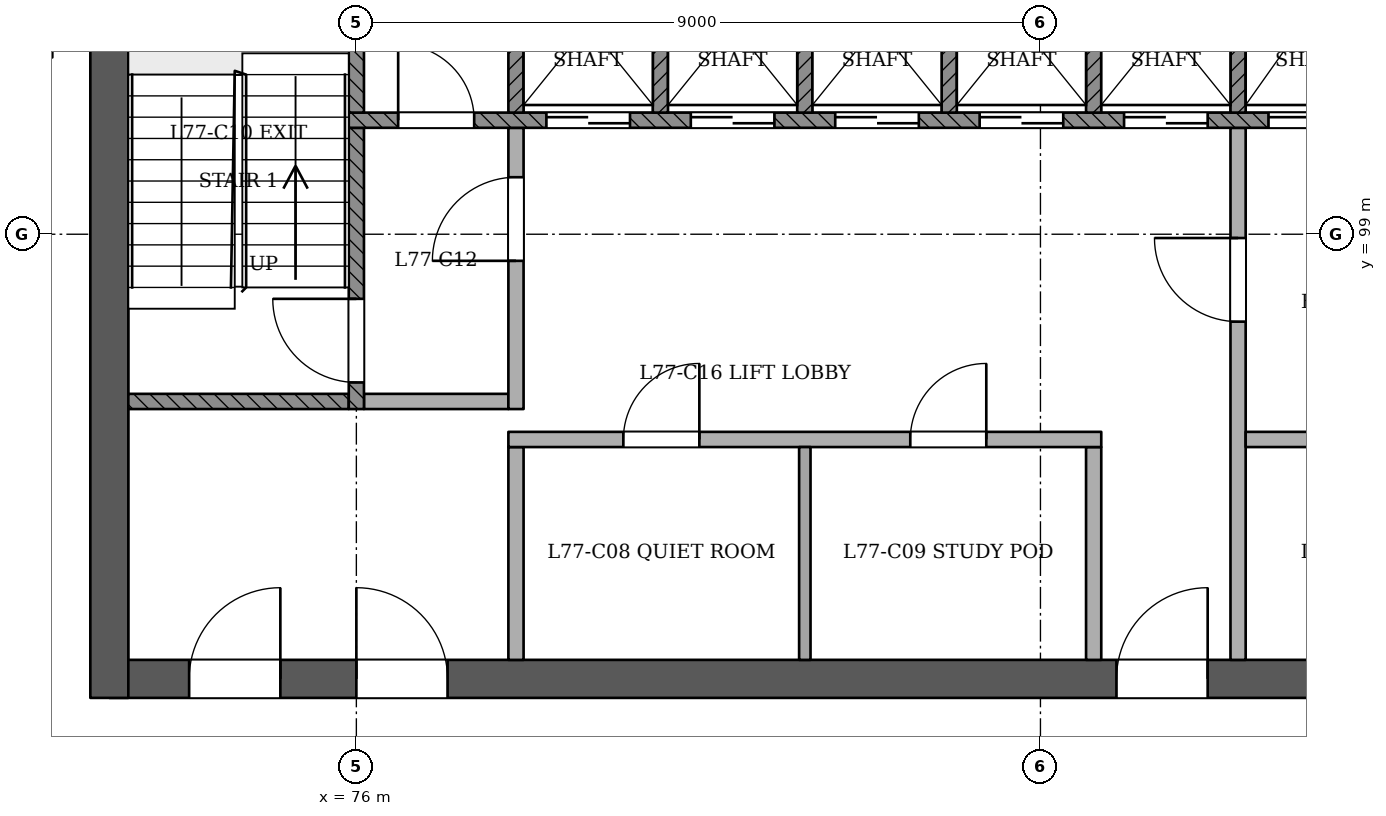
"""IFC4 building model, lengths in metres.
Left out: names, types, materials, properties, quantities, classifications, styles, units other than length and angle.
Written with IfcOpenShell. Run it as: python <this file> out.ifc"""

import sys

from ifc_helpers import new_model, si_unit, direction, frame, frame_2d, origin, place, context, subcontext, project, spatial, rectangle, extrude, element, fill, save


model = new_model("IFC4")
c1 = context("Model", 3, precision=1e-05, world=origin(), true_north=direction((0.0, 1.0)))
c2 = subcontext(c1, "Body", "Model", "MODEL_VIEW")
j1 = project(units=[si_unit("LENGTHUNIT", "METRE"), si_unit("PLANEANGLEUNIT", "RADIAN")], contexts=[c1])
p1 = place(None, origin())
s1 = spatial("IfcSite", under=j1, at=p1, CompositionType="ELEMENT")
p2 = place(p1, origin())
s2 = spatial("IfcBuilding", under=s1, at=p2, CompositionType="ELEMENT")
p3 = place(p2, frame((0.0, 0.0, 298.6)))
s3 = spatial("IfcBuildingStorey", under=s2, at=p3, CompositionType="ELEMENT", Elevation=298.6)
p4 = place(p3, frame((72.75, 93.15, 0.0), z_axis=(0.0, 0.0, 1.0), x_axis=(1.0, 0.0, 0.0)))
e1 = element("IfcWall", 1, at=p4, inside=s3, PredefinedType="SHEAR", context=c2, shape_type="SweptSolid", body=[
    extrude(rectangle(XDim=24.75, YDim=0.5, at=frame_2d((12.375, 0.0))), origin(), (0.0, 0.0, 1.0), 3.6),
])
p5 = place(p4, frame((1.05, 0.0, 0.0)))
e2 = element("IfcOpeningElement", 2, at=p5, cuts=e1, PredefinedType="OPENING", context=c2, shape_type="SweptSolid", body=[
    extrude(rectangle(XDim=1.2, YDim=2.1, at=frame_2d((0.6, 1.05))), frame((0.0, 0.26, 0.0), z_axis=(0.0, -1.0, 0.0), x_axis=(1.0, 0.0, 0.0)), (0.0, 0.0, 1.0), 0.521),
])
p6 = place(p4, frame((3.25, 0.0, 0.0)))
e3 = element("IfcOpeningElement", 3, at=p6, cuts=e1, PredefinedType="OPENING", context=c2, shape_type="SweptSolid", body=[
    extrude(rectangle(XDim=1.2, YDim=2.1, at=frame_2d((0.6, 1.05))), frame((0.0, 0.26, 0.0), z_axis=(0.0, -1.0, 0.0), x_axis=(1.0, 0.0, 0.0)), (0.0, 0.0, 1.0), 0.521),
])
p7 = place(p4, frame((13.25, 0.0, 0.0)))
e4 = element("IfcOpeningElement", 4, at=p7, cuts=e1, PredefinedType="OPENING", context=c2, shape_type="SweptSolid", body=[
    extrude(rectangle(XDim=1.2, YDim=2.1, at=frame_2d((0.6, 1.05))), frame((0.0, 0.26, 0.0), z_axis=(0.0, -1.0, 0.0), x_axis=(1.0, 0.0, 0.0)), (0.0, 0.0, 1.0), 0.521),
])
p8 = place(p4, frame((16.663, 0.0, 0.0)))
e5 = element("IfcOpeningElement", 5, at=p8, cuts=e1, PredefinedType="OPENING", context=c2, shape_type="SweptSolid", body=[
    extrude(rectangle(XDim=1.0, YDim=2.1, at=frame_2d((0.5, 1.05))), frame((0.0, 0.26, 0.0), z_axis=(0.0, -1.0, 0.0), x_axis=(1.0, 0.0, 0.0)), (0.0, 0.0, 1.0), 0.521),
])
p9 = place(p4, frame((20.55, 0.0, 0.0)))
e6 = element("IfcOpeningElement", 6, at=p9, cuts=e1, PredefinedType="OPENING", context=c2, shape_type="SweptSolid", body=[
    extrude(rectangle(XDim=1.0, YDim=2.1, at=frame_2d((0.5, 1.05))), frame((0.0, 0.26, 0.0), z_axis=(0.0, -1.0, 0.0), x_axis=(1.0, 0.0, 0.0)), (0.0, 0.0, 1.0), 0.521),
])
p10 = place(p4, frame((22.988, 0.0, 0.0)))
e7 = element("IfcOpeningElement", 7, at=p10, cuts=e1, PredefinedType="OPENING", context=c2, shape_type="SweptSolid", body=[
    extrude(rectangle(XDim=1.0, YDim=2.1, at=frame_2d((0.5, 1.05))), frame((0.0, 0.26, 0.0), z_axis=(0.0, -1.0, 0.0), x_axis=(1.0, 0.0, 0.0)), (0.0, 0.0, 1.0), 0.521),
])
p11 = place(p3, frame((72.75, 103.65, 0.0), z_axis=(0.0, 0.0, 1.0), x_axis=(0.0, -1.0, 0.0)))
e8 = element("IfcWall", 8, at=p11, inside=s3, PredefinedType="SHEAR", context=c2, shape_type="SweptSolid", body=[
    extrude(rectangle(XDim=10.75, YDim=0.5, at=frame_2d((5.375, 0.0))), origin(), (0.0, 0.0, 1.0), 3.6),
])
p12 = place(p3, frame((72.0, 101.401, 0.0), z_axis=(0.0, 0.0, 1.0), x_axis=(-0.999999989991, -0.000141482738, 0.0)))
e9 = element("IfcWall", 9, at=p12, inside=s3, PredefinedType="PARTITIONING", context=c2, shape_type="SweptSolid", body=[
    extrude(rectangle(XDim=1.726, YDim=0.15, at=frame_2d((0.863, 0.0))), origin(), (0.0, 0.0, 1.0), 3.2),
])
p13 = place(p3, frame((78.1, 93.4, 0.0), z_axis=(0.0, 0.0, 1.0), x_axis=(0.0, 1.0, 0.0)))
e10 = element("IfcWall", 10, at=p13, inside=s3, PredefinedType="PARTITIONING", context=c2, shape_type="SweptSolid", body=[
    extrude(rectangle(XDim=2.8, YDim=0.2, at=frame_2d((1.4, 0.0))), origin(), (0.0, 0.0, 1.0), 3.2),
])
p14 = place(p3, frame((81.9, 93.4, 0.0), z_axis=(0.0, 0.0, 1.0), x_axis=(0.0, 1.0, 0.0)))
e11 = element("IfcWall", 11, at=p14, inside=s3, PredefinedType="PARTITIONING", context=c2, shape_type="SweptSolid", body=[
    extrude(rectangle(XDim=2.8, YDim=0.15, at=frame_2d((1.4, 0.0))), origin(), (0.0, 0.0, 1.0), 3.2),
])
p15 = place(p3, frame((85.7, 93.4, 0.0), z_axis=(0.0, 0.0, 1.0), x_axis=(0.0, 1.0, 0.0)))
e12 = element("IfcWall", 12, at=p15, inside=s3, PredefinedType="PARTITIONING", context=c2, shape_type="SweptSolid", body=[
    extrude(rectangle(XDim=2.8, YDim=0.2, at=frame_2d((1.4, 0.0))), origin(), (0.0, 0.0, 1.0), 3.2),
])
p16 = place(p3, frame((87.6, 93.4, 0.0), z_axis=(0.0, 0.0, 1.0), x_axis=(0.0, 1.0, 0.0)))
e13 = element("IfcWall", 13, at=p16, inside=s3, PredefinedType="PARTITIONING", context=c2, shape_type="SweptSolid", body=[
    extrude(rectangle(XDim=7.0, YDim=0.2, at=frame_2d((3.5, 0.0))), origin(), (0.0, 0.0, 1.0), 3.2),
])
p17 = place(p16, frame((4.45, 0.0, 0.0)))
e14 = element("IfcOpeningElement", 14, at=p17, cuts=e13, PredefinedType="OPENING", context=c2, shape_type="SweptSolid", body=[
    extrude(rectangle(XDim=1.1, YDim=2.1, at=frame_2d((0.55, 1.05))), frame((0.0, 0.11, 0.0), z_axis=(0.0, -1.0, 0.0), x_axis=(1.0, 0.0, 0.0)), (0.0, 0.0, 1.0), 0.221),
])
p18 = place(p3, frame((78.0, 96.3, 0.0), z_axis=(0.0, 0.0, 1.0), x_axis=(1.0, 0.0, 0.0)))
e15 = element("IfcWall", 15, at=p18, inside=s3, PredefinedType="PARTITIONING", context=c2, shape_type="SweptSolid", body=[
    extrude(rectangle(XDim=7.8, YDim=0.2, at=frame_2d((3.9, 0.0))), origin(), (0.0, 0.0, 1.0), 3.2),
])
p19 = place(p18, frame((1.512, 0.0, 0.0)))
e16 = element("IfcOpeningElement", 16, at=p19, cuts=e15, PredefinedType="OPENING", context=c2, shape_type="SweptSolid", body=[
    extrude(rectangle(XDim=1.0, YDim=2.1, at=frame_2d((0.5, 1.05))), frame((0.0, 0.11, 0.0), z_axis=(0.0, -1.0, 0.0), x_axis=(1.0, 0.0, 0.0)), (0.0, 0.0, 1.0), 0.221),
])
p20 = place(p18, frame((5.288, 0.0, 0.0)))
e17 = element("IfcOpeningElement", 17, at=p20, cuts=e15, PredefinedType="OPENING", context=c2, shape_type="SweptSolid", body=[
    extrude(rectangle(XDim=1.0, YDim=2.1, at=frame_2d((0.5, 1.05))), frame((0.0, 0.11, 0.0), z_axis=(0.0, -1.0, 0.0), x_axis=(1.0, 0.0, 0.0)), (0.0, 0.0, 1.0), 0.221),
])
p21 = place(p3, frame((87.7, 96.3, 0.0), z_axis=(0.0, 0.0, 1.0), x_axis=(1.0, 0.0, 0.0)))
e18 = element("IfcWall", 18, at=p21, inside=s3, PredefinedType="PARTITIONING", context=c2, shape_type="SweptSolid", body=[
    extrude(rectangle(XDim=3.6, YDim=0.2, at=frame_2d((1.8, 0.0))), origin(), (0.0, 0.0, 1.0), 3.2),
])
p22 = place(p3, frame((73.0, 96.8, 0.0), z_axis=(0.0, 0.0, 1.0), x_axis=(1.0, 0.0, 0.0)))
e19 = element("IfcWall", 19, at=p22, inside=s3, PredefinedType="SOLIDWALL", context=c2, shape_type="SweptSolid", body=[
    extrude(rectangle(XDim=2.9, YDim=0.2, at=frame_2d((1.45, 0.0))), origin(), (0.0, 0.0, 1.0), 3.2),
])
p23 = place(p3, frame((76.0, 96.7, 0.0), z_axis=(0.0, 0.0, 1.0), x_axis=(0.0, 1.0, 0.0)))
e20 = element("IfcWall", 20, at=p23, inside=s3, PredefinedType="SOLIDWALL", context=c2, shape_type="SweptSolid", body=[
    extrude(rectangle(XDim=3.7, YDim=0.2, at=frame_2d((1.85, 0.0))), origin(), (0.0, 0.0, 1.0), 3.2),
])
p24 = place(p23, frame((0.35, 0.0, 0.0)))
e21 = element("IfcOpeningElement", 21, at=p24, cuts=e20, PredefinedType="OPENING", context=c2, shape_type="SweptSolid", body=[
    extrude(rectangle(XDim=1.1, YDim=2.1, at=frame_2d((0.55, 1.05))), frame((0.0, 0.11, 0.0), z_axis=(0.0, -1.0, 0.0), x_axis=(1.0, 0.0, 0.0)), (0.0, 0.0, 1.0), 0.221),
])
p25 = place(p3, frame((76.1, 96.8, 0.0), z_axis=(0.0, 0.0, 1.0), x_axis=(1.0, 0.0, 0.0)))
e22 = element("IfcWall", 22, at=p25, inside=s3, PredefinedType="PARTITIONING", context=c2, shape_type="SweptSolid", body=[
    extrude(rectangle(XDim=1.9, YDim=0.2, at=frame_2d((0.95, 0.0))), origin(), (0.0, 0.0, 1.0), 3.2),
])
p26 = place(p3, frame((78.1, 96.7, 0.0), z_axis=(0.0, 0.0, 1.0), x_axis=(0.0, 1.0, 0.0)))
e23 = element("IfcWall", 23, at=p26, inside=s3, PredefinedType="PARTITIONING", context=c2, shape_type="SweptSolid", body=[
    extrude(rectangle(XDim=3.7, YDim=0.2, at=frame_2d((1.85, 0.0))), origin(), (0.0, 0.0, 1.0), 3.2),
])
p27 = place(p26, frame((1.95, 0.0, 0.0)))
e24 = element("IfcOpeningElement", 24, at=p27, cuts=e23, PredefinedType="OPENING", context=c2, shape_type="SweptSolid", body=[
    extrude(rectangle(XDim=1.1, YDim=2.1, at=frame_2d((0.55, 1.05))), frame((0.0, 0.11, 0.0), z_axis=(0.0, -1.0, 0.0), x_axis=(1.0, 0.0, 0.0)), (0.0, 0.0, 1.0), 0.221),
])
p28 = place(p3, frame((75.9, 100.5, 0.0), z_axis=(0.0, 0.0, 1.0), x_axis=(1.0, 0.0, 0.0)))
e25 = element("IfcWall", 25, at=p28, inside=s3, PredefinedType="SOLIDWALL", context=c2, shape_type="SweptSolid", body=[
    extrude(rectangle(XDim=18.2, YDim=0.2, at=frame_2d((9.1, 0.0))), origin(), (0.0, 0.0, 1.0), 3.2),
])
p29 = place(p28, frame((2.6, 0.0, 0.0)))
e26 = element("IfcOpeningElement", 26, at=p29, cuts=e25, PredefinedType="OPENING", context=c2, shape_type="SweptSolid", body=[
    extrude(rectangle(XDim=1.1, YDim=2.1, at=frame_2d((0.55, 1.05))), frame((0.0, 0.11, 0.0), z_axis=(0.0, -1.0, 0.0), x_axis=(1.0, 0.0, 0.0)), (0.0, 0.0, 1.0), 0.221),
])
p30 = place(p28, frame((4.5, 0.0, 0.0)))
e27 = element("IfcOpeningElement", 27, at=p30, cuts=e25, PredefinedType="OPENING", context=c2, shape_type="SweptSolid", body=[
    extrude(rectangle(XDim=1.1, YDim=2.1, at=frame_2d((0.55, 1.05))), frame((0.0, 0.11, 0.0), z_axis=(0.0, -1.0, 0.0), x_axis=(1.0, 0.0, 0.0)), (0.0, 0.0, 1.0), 0.221),
])
p31 = place(p28, frame((6.4, 0.0, 0.0)))
e28 = element("IfcOpeningElement", 28, at=p31, cuts=e25, PredefinedType="OPENING", context=c2, shape_type="SweptSolid", body=[
    extrude(rectangle(XDim=1.1, YDim=2.1, at=frame_2d((0.55, 1.05))), frame((0.0, 0.11, 0.0), z_axis=(0.0, -1.0, 0.0), x_axis=(1.0, 0.0, 0.0)), (0.0, 0.0, 1.0), 0.221),
])
p32 = place(p28, frame((8.3, 0.0, 0.0)))
e29 = element("IfcOpeningElement", 29, at=p32, cuts=e25, PredefinedType="OPENING", context=c2, shape_type="SweptSolid", body=[
    extrude(rectangle(XDim=1.1, YDim=2.1, at=frame_2d((0.55, 1.05))), frame((0.0, 0.11, 0.0), z_axis=(0.0, -1.0, 0.0), x_axis=(1.0, 0.0, 0.0)), (0.0, 0.0, 1.0), 0.221),
])
p33 = place(p28, frame((10.2, 0.0, 0.0)))
e30 = element("IfcOpeningElement", 30, at=p33, cuts=e25, PredefinedType="OPENING", context=c2, shape_type="SweptSolid", body=[
    extrude(rectangle(XDim=1.1, YDim=2.1, at=frame_2d((0.55, 1.05))), frame((0.0, 0.11, 0.0), z_axis=(0.0, -1.0, 0.0), x_axis=(1.0, 0.0, 0.0)), (0.0, 0.0, 1.0), 0.221),
])
p34 = place(p28, frame((12.1, 0.0, 0.0)))
e31 = element("IfcOpeningElement", 31, at=p34, cuts=e25, PredefinedType="OPENING", context=c2, shape_type="SweptSolid", body=[
    extrude(rectangle(XDim=1.1, YDim=2.1, at=frame_2d((0.55, 1.05))), frame((0.0, 0.11, 0.0), z_axis=(0.0, -1.0, 0.0), x_axis=(1.0, 0.0, 0.0)), (0.0, 0.0, 1.0), 0.221),
])
p35 = place(p28, frame((14.0, 0.0, 0.0)))
e32 = element("IfcOpeningElement", 32, at=p35, cuts=e25, PredefinedType="OPENING", context=c2, shape_type="SweptSolid", body=[
    extrude(rectangle(XDim=1.1, YDim=2.1, at=frame_2d((0.55, 1.05))), frame((0.0, 0.11, 0.0), z_axis=(0.0, -1.0, 0.0), x_axis=(1.0, 0.0, 0.0)), (0.0, 0.0, 1.0), 0.221),
])
p36 = place(p28, frame((0.65, 0.0, 0.0)))
e33 = element("IfcOpeningElement", 33, at=p36, cuts=e25, PredefinedType="OPENING", context=c2, shape_type="SweptSolid", body=[
    extrude(rectangle(XDim=1.0, YDim=2.1, at=frame_2d((0.5, 1.05))), frame((0.0, 0.11, 0.0), z_axis=(0.0, -1.0, 0.0), x_axis=(1.0, 0.0, 0.0)), (0.0, 0.0, 1.0), 0.221),
])
p37 = place(p28, frame((16.3, 0.0, 0.0)))
e34 = element("IfcOpeningElement", 34, at=p37, cuts=e25, PredefinedType="OPENING", context=c2, shape_type="SweptSolid", body=[
    extrude(rectangle(XDim=1.0, YDim=2.1, at=frame_2d((0.5, 1.05))), frame((0.0, 0.11, 0.0), z_axis=(0.0, -1.0, 0.0), x_axis=(1.0, 0.0, 0.0)), (0.0, 0.0, 1.0), 0.221),
])
for number, where, z_axis, x_axis in (
    (35, (76.0, 100.6, 0.0), (0.0, 0.0, 1.0), (0.0, 1.0, 0.0)),
    (36, (78.1, 100.6, 0.0), (0.0, 0.0, 1.0), (0.0, 1.0, 0.0)),
    (37, (80.0, 100.6, 0.0), (0.0, 0.0, 1.0), (0.0, 1.0, 0.0)),
    (38, (81.9, 100.6, 0.0), (0.0, 0.0, 1.0), (0.0, 1.0, 0.0)),
    (39, (83.8, 100.6, 0.0), (0.0, 0.0, 1.0), (0.0, 1.0, 0.0)),
    (40, (85.7, 100.6, 0.0), (0.0, 0.0, 1.0), (0.0, 1.0, 0.0)),
    (41, (87.6, 100.6, 0.0), (0.0, 0.0, 1.0), (0.0, 1.0, 0.0)),
):
    element("IfcWall", number, at=place(p3, frame(where, z_axis=z_axis, x_axis=x_axis)), inside=s3, PredefinedType="SOLIDWALL", context=c2, shape_type="SweptSolid", body=[
        extrude(rectangle(XDim=2.8, YDim=0.2, at=frame_2d((1.4, 0.0))), origin(), (0.0, 0.0, 1.0), 3.2),
    ])
p38 = place(p29, origin())
e42 = element("IfcDoor", 42, at=p38, inside=s3, OperationType="SLIDING_TO_RIGHT", PredefinedType="NOTDEFINED", context=c2, shape_type="SweptSolid", body=[
    extrude(rectangle(XDim=1.1, YDim=2.1, at=frame_2d((0.55, 1.05))), frame((0.0, 0.025, 0.0), z_axis=(0.0, -1.0, 0.0), x_axis=(1.0, 0.0, 0.0)), (0.0, 0.0, 1.0), 0.05),
])
fill(e26, e42)
p39 = place(p30, origin())
e43 = element("IfcDoor", 43, at=p39, inside=s3, OperationType="SLIDING_TO_LEFT", PredefinedType="NOTDEFINED", context=c2, shape_type="SweptSolid", body=[
    extrude(rectangle(XDim=1.1, YDim=2.1, at=frame_2d((0.55, 1.05))), frame((0.0, 0.025, 0.0), z_axis=(0.0, -1.0, 0.0), x_axis=(1.0, 0.0, 0.0)), (0.0, 0.0, 1.0), 0.05),
])
fill(e27, e43)
p40 = place(p31, origin())
e44 = element("IfcDoor", 44, at=p40, inside=s3, OperationType="SLIDING_TO_RIGHT", PredefinedType="NOTDEFINED", context=c2, shape_type="SweptSolid", body=[
    extrude(rectangle(XDim=1.1, YDim=2.1, at=frame_2d((0.55, 1.05))), frame((0.0, 0.025, 0.0), z_axis=(0.0, -1.0, 0.0), x_axis=(1.0, 0.0, 0.0)), (0.0, 0.0, 1.0), 0.05),
])
fill(e28, e44)
p41 = place(p32, origin())
e45 = element("IfcDoor", 45, at=p41, inside=s3, OperationType="SLIDING_TO_LEFT", PredefinedType="NOTDEFINED", context=c2, shape_type="SweptSolid", body=[
    extrude(rectangle(XDim=1.1, YDim=2.1, at=frame_2d((0.55, 1.05))), frame((0.0, 0.025, 0.0), z_axis=(0.0, -1.0, 0.0), x_axis=(1.0, 0.0, 0.0)), (0.0, 0.0, 1.0), 0.05),
])
fill(e29, e45)
p42 = place(p33, origin())
e46 = element("IfcDoor", 46, at=p42, inside=s3, OperationType="SLIDING_TO_RIGHT", PredefinedType="NOTDEFINED", context=c2, shape_type="SweptSolid", body=[
    extrude(rectangle(XDim=1.1, YDim=2.1, at=frame_2d((0.55, 1.05))), frame((0.0, 0.025, 0.0), z_axis=(0.0, -1.0, 0.0), x_axis=(1.0, 0.0, 0.0)), (0.0, 0.0, 1.0), 0.05),
])
fill(e30, e46)
p43 = place(p34, origin())
e47 = element("IfcDoor", 47, at=p43, inside=s3, OperationType="SLIDING_TO_RIGHT", PredefinedType="NOTDEFINED", context=c2, shape_type="SweptSolid", body=[
    extrude(rectangle(XDim=1.1, YDim=2.1, at=frame_2d((0.55, 1.05))), frame((0.0, 0.025, 0.0), z_axis=(0.0, -1.0, 0.0), x_axis=(1.0, 0.0, 0.0)), (0.0, 0.0, 1.0), 0.05),
])
fill(e31, e47)
p44 = place(p24, origin())
e48 = element("IfcDoor", 48, at=p44, inside=s3, OperationType="SINGLE_SWING_RIGHT", PredefinedType="NOTDEFINED", context=c2, shape_type="SweptSolid", body=[
    extrude(rectangle(XDim=1.1, YDim=2.1, at=frame_2d((0.55, 1.05))), frame((0.0, 0.025, 0.0), z_axis=(0.0, -1.0, 0.0), x_axis=(1.0, 0.0, 0.0)), (0.0, 0.0, 1.0), 0.05),
])
fill(e21, e48)
p45 = place(p27, origin())
e49 = element("IfcDoor", 49, at=p45, inside=s3, OperationType="SINGLE_SWING_LEFT", PredefinedType="NOTDEFINED", context=c2, shape_type="SweptSolid", body=[
    extrude(rectangle(XDim=1.1, YDim=2.1, at=frame_2d((0.55, 1.05))), frame((0.0, 0.025, 0.0), z_axis=(0.0, -1.0, 0.0), x_axis=(1.0, 0.0, 0.0)), (0.0, 0.0, 1.0), 0.05),
])
fill(e24, e49)
p46 = place(p17, origin())
e50 = element("IfcDoor", 50, at=p46, inside=s3, OperationType="SINGLE_SWING_RIGHT", PredefinedType="NOTDEFINED", context=c2, shape_type="SweptSolid", body=[
    extrude(rectangle(XDim=1.1, YDim=2.1, at=frame_2d((0.55, 1.05))), frame((0.0, 0.025, 0.0), z_axis=(0.0, -1.0, 0.0), x_axis=(1.0, 0.0, 0.0)), (0.0, 0.0, 1.0), 0.05),
])
fill(e14, e50)
p47 = place(p5, origin())
e51 = element("IfcDoor", 51, at=p47, inside=s3, OperationType="SINGLE_SWING_RIGHT", PredefinedType="NOTDEFINED", context=c2, shape_type="SweptSolid", body=[
    extrude(rectangle(XDim=1.2, YDim=2.1, at=frame_2d((0.6, 1.05))), frame((0.0, 0.025, 0.0), z_axis=(0.0, -1.0, 0.0), x_axis=(1.0, 0.0, 0.0)), (0.0, 0.0, 1.0), 0.05),
])
fill(e2, e51)
p48 = place(p6, origin())
e52 = element("IfcDoor", 52, at=p48, inside=s3, OperationType="SINGLE_SWING_LEFT", PredefinedType="NOTDEFINED", context=c2, shape_type="SweptSolid", body=[
    extrude(rectangle(XDim=1.2, YDim=2.1, at=frame_2d((0.6, 1.05))), frame((0.0, 0.025, 0.0), z_axis=(0.0, -1.0, 0.0), x_axis=(1.0, 0.0, 0.0)), (0.0, 0.0, 1.0), 0.05),
])
fill(e3, e52)
p49 = place(p7, origin())
e53 = element("IfcDoor", 53, at=p49, inside=s3, OperationType="SINGLE_SWING_RIGHT", PredefinedType="NOTDEFINED", context=c2, shape_type="SweptSolid", body=[
    extrude(rectangle(XDim=1.2, YDim=2.1, at=frame_2d((0.6, 1.05))), frame((0.0, 0.025, 0.0), z_axis=(0.0, -1.0, 0.0), x_axis=(1.0, 0.0, 0.0)), (0.0, 0.0, 1.0), 0.05),
])
fill(e4, e53)
p50 = place(p36, origin())
e54 = element("IfcDoor", 54, at=p50, inside=s3, OperationType="SINGLE_SWING_LEFT", PredefinedType="NOTDEFINED", context=c2, shape_type="SweptSolid", body=[
    extrude(rectangle(XDim=1.0, YDim=2.1, at=frame_2d((0.5, 1.05))), frame((0.0, 0.025, 0.0), z_axis=(0.0, -1.0, 0.0), x_axis=(1.0, 0.0, 0.0)), (0.0, 0.0, 1.0), 0.05),
])
fill(e33, e54)
p51 = place(p19, origin())
e55 = element("IfcDoor", 55, at=p51, inside=s3, OperationType="SINGLE_SWING_RIGHT", PredefinedType="NOTDEFINED", context=c2, shape_type="SweptSolid", body=[
    extrude(rectangle(XDim=1.0, YDim=2.1, at=frame_2d((0.5, 1.05))), frame((0.0, 0.025, 0.0), z_axis=(0.0, -1.0, 0.0), x_axis=(1.0, 0.0, 0.0)), (0.0, 0.0, 1.0), 0.05),
])
fill(e16, e55)
p52 = place(p20, origin())
e56 = element("IfcDoor", 56, at=p52, inside=s3, OperationType="SINGLE_SWING_RIGHT", PredefinedType="NOTDEFINED", context=c2, shape_type="SweptSolid", body=[
    extrude(rectangle(XDim=1.0, YDim=2.1, at=frame_2d((0.5, 1.05))), frame((0.0, 0.025, 0.0), z_axis=(0.0, -1.0, 0.0), x_axis=(1.0, 0.0, 0.0)), (0.0, 0.0, 1.0), 0.05),
])
fill(e17, e56)
save(model, sys.argv[1])
